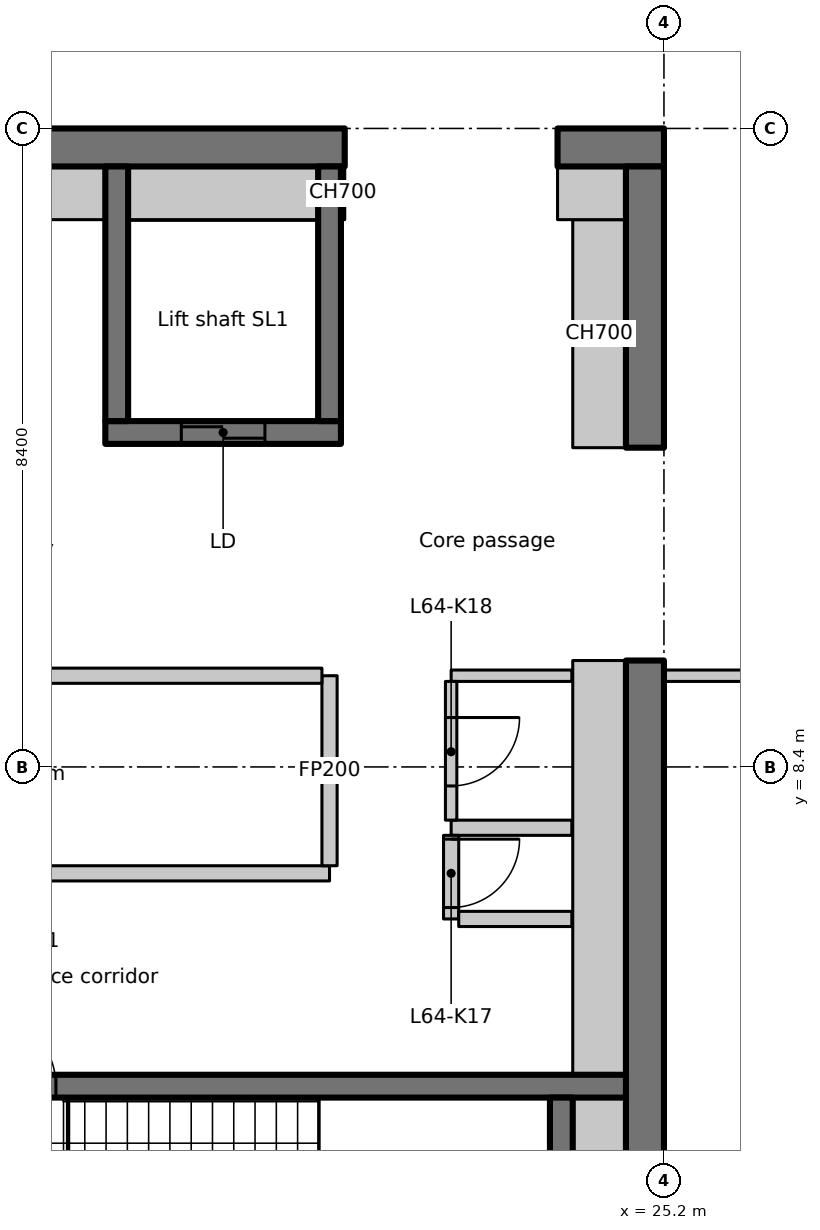
"""IFC4 building model, lengths in metres.
Left out: names, types, materials, properties, quantities, classifications, styles, units other than length and angle.
Written with IfcOpenShell. Run it as: python <this file> out.ifc"""

import sys

from ifc_helpers import new_model, si_unit, direction, frame, frame_2d, origin, place, context, subcontext, project, spatial, rectangle, extrude, element, fill, save


model = new_model("IFC4")
c1 = context("Model", 3, precision=1e-05, world=origin(), true_north=direction((0.0, 1.0)))
c2 = subcontext(c1, "Body", "Model", "MODEL_VIEW")
j1 = project(units=[si_unit("LENGTHUNIT", "METRE"), si_unit("PLANEANGLEUNIT", "RADIAN")], contexts=[c1])
p1 = place(None, origin())
s1 = spatial("IfcSite", under=j1, at=p1, CompositionType="ELEMENT")
p2 = place(p1, origin())
s2 = spatial("IfcBuilding", under=s1, at=p2, CompositionType="ELEMENT")
p3 = place(p2, frame((0.0, 0.0, 251.7)))
s3 = spatial("IfcBuildingStorey", under=s2, at=p3, CompositionType="ELEMENT", Elevation=251.7)
p4 = place(p3, frame((-1.1, 16.55, 0.0), z_axis=(0.0, 0.0, 1.0), x_axis=(1.0, 0.0, 0.0)))
e1 = element("IfcWall", 1, at=p4, inside=s3, PredefinedType="SHEAR", context=c2, shape_type="SweptSolid", body=[
    extrude(rectangle(XDim=22.1, YDim=0.5, at=frame_2d((11.05, 0.0))), origin(), (0.0, 0.0, 1.0), 4.05),
])
p5 = place(p4, frame((3.15, 0.0, 0.0)))
e2 = element("IfcOpeningElement", 2, at=p5, cuts=e1, PredefinedType="OPENING", context=c2, shape_type="SweptSolid", body=[
    extrude(rectangle(XDim=1.1, YDim=2.3, at=frame_2d((0.55, 1.15))), frame((0.0, 0.26, 0.0), z_axis=(0.0, -1.0, 0.0), x_axis=(1.0, 0.0, 0.0)), (0.0, 0.0, 1.0), 0.52),
])
p6 = place(p3, frame((23.8, 16.55, 0.0), z_axis=(0.0, 0.0, 1.0), x_axis=(1.0, 0.0, 0.0)))
e3 = element("IfcWall", 3, at=p6, inside=s3, PredefinedType="SHEAR", context=c2, shape_type="SweptSolid", body=[
    extrude(rectangle(XDim=1.4, YDim=0.5, at=frame_2d((0.7, 0.0))), origin(), (0.0, 0.0, 1.0), 4.05),
])
p7 = place(p3, frame((24.95, 0.5, 0.0), z_axis=(0.0, 0.0, 1.0), x_axis=(0.0, 1.0, 0.0)))
e4 = element("IfcWall", 4, at=p7, inside=s3, PredefinedType="SHEAR", context=c2, shape_type="SweptSolid", body=[
    extrude(rectangle(XDim=9.3, YDim=0.5, at=frame_2d((4.65, 0.0))), origin(), (0.0, 0.0, 1.0), 4.05),
])
p8 = place(p3, frame((24.95, 12.6, 0.0), z_axis=(0.0, 0.0, 1.0), x_axis=(0.0, 1.0, 0.0)))
e5 = element("IfcWall", 5, at=p8, inside=s3, PredefinedType="SHEAR", context=c2, shape_type="SweptSolid", body=[
    extrude(rectangle(XDim=3.7, YDim=0.5, at=frame_2d((1.85, 0.0))), origin(), (0.0, 0.0, 1.0), 4.05),
])
p9 = place(p3, frame((24.35, 12.6, 0.0), z_axis=(0.0, 0.0, 1.0), x_axis=(0.0, 1.0, 0.0)))
e6 = element("IfcWall", 6, at=p9, inside=s3, PredefinedType="PARTITIONING", context=c2, shape_type="SweptSolid", body=[
    extrude(rectangle(XDim=3.0, YDim=0.7, at=frame_2d((1.5, 0.0))), origin(), (0.0, 0.0, 1.0), 4.05),
])
p10 = place(p3, frame((23.8, 15.95, 0.0), z_axis=(0.0, 0.0, 1.0), x_axis=(1.0, 0.0, 0.0)))
e7 = element("IfcWall", 7, at=p10, inside=s3, PredefinedType="PARTITIONING", context=c2, shape_type="SweptSolid", body=[
    extrude(rectangle(XDim=0.9, YDim=0.7, at=frame_2d((0.45, 0.0))), origin(), (0.0, 0.0, 1.0), 4.05),
])
p11 = place(p3, frame((17.85, 12.8, 0.0), z_axis=(0.0, 0.0, 1.0), x_axis=(1.0, 0.0, 0.0)))
e8 = element("IfcWall", 8, at=p11, inside=s3, PredefinedType="SHEAR", context=c2, shape_type="SweptSolid", body=[
    extrude(rectangle(XDim=3.1, YDim=0.3, at=frame_2d((1.55, 0.0))), origin(), (0.0, 0.0, 1.0), 4.05),
])
p12 = place(p11, frame((1.0, 0.0, 0.0)))
e9 = element("IfcOpeningElement", 9, at=p12, cuts=e8, PredefinedType="OPENING", context=c2, shape_type="SweptSolid", body=[
    extrude(rectangle(XDim=1.1, YDim=2.3, at=frame_2d((0.55, 1.15))), frame((0.0, 0.16, 0.0), z_axis=(0.0, -1.0, 0.0), x_axis=(1.0, 0.0, 0.0)), (0.0, 0.0, 1.0), 0.32),
])
for number, where, z_axis, x_axis in (
    (10, (18.0, 12.95, 0.0), (0.0, 0.0, 1.0), (0.0, 1.0, 0.0)),
    (11, (20.8, 12.95, 0.0), (0.0, 0.0, 1.0), (0.0, 1.0, 0.0)),
):
    element("IfcWall", number, at=place(p3, frame(where, z_axis=z_axis, x_axis=x_axis)), inside=s3, PredefinedType="SHEAR", context=c2, shape_type="SweptSolid", body=[
        extrude(rectangle(XDim=3.35, YDim=0.3, at=frame_2d((1.675, 0.0))), origin(), (0.0, 0.0, 1.0), 4.05),
    ])
p13 = place(p3, frame((15.8, 4.2, 0.0), z_axis=(0.0, 0.0, 1.0), x_axis=(1.0, 0.0, 0.0)))
e12 = element("IfcWall", 12, at=p13, inside=s3, PredefinedType="SHEAR", context=c2, shape_type="SweptSolid", body=[
    extrude(rectangle(XDim=8.9, YDim=0.3, at=frame_2d((4.45, 0.0))), origin(), (0.0, 0.0, 1.0), 4.05),
])
p14 = place(p13, frame((0.4, 0.0, 0.0)))
e13 = element("IfcOpeningElement", 13, at=p14, cuts=e12, PredefinedType="OPENING", context=c2, shape_type="SweptSolid", body=[
    extrude(rectangle(XDim=1.0, YDim=2.1, at=frame_2d((0.5, 1.05))), frame((0.0, 0.16, 0.0), z_axis=(0.0, -1.0, 0.0), x_axis=(1.0, 0.0, 0.0)), (0.0, 0.0, 1.0), 0.32),
])
p15 = place(p3, frame((23.85, 1.5, 0.0), z_axis=(0.0, 0.0, 1.0), x_axis=(0.0, 1.0, 0.0)))
e14 = element("IfcWall", 14, at=p15, inside=s3, PredefinedType="SHEAR", context=c2, shape_type="SweptSolid", body=[
    extrude(rectangle(XDim=2.55, YDim=0.3, at=frame_2d((1.275, 0.0))), origin(), (0.0, 0.0, 1.0), 4.05),
])
p16 = place(p3, frame((12.4, 7.0, 0.0), z_axis=(0.0, 0.0, 1.0), x_axis=(1.0, 0.0, 0.0)))
e15 = element("IfcWall", 15, at=p16, inside=s3, PredefinedType="PARTITIONING", context=c2, shape_type="SweptSolid", body=[
    extrude(rectangle(XDim=8.4, YDim=0.2, at=frame_2d((4.2, 0.0))), origin(), (0.0, 0.0, 1.0), 4.05),
])
p17 = place(p3, frame((20.8, 7.1, 0.0), z_axis=(0.0, 0.0, 1.0), x_axis=(0.0, 1.0, 0.0)))
e16 = element("IfcWall", 16, at=p17, inside=s3, PredefinedType="PARTITIONING", context=c2, shape_type="SweptSolid", body=[
    extrude(rectangle(XDim=2.5, YDim=0.2, at=frame_2d((1.25, 0.0))), origin(), (0.0, 0.0, 1.0), 4.05),
])
p18 = place(p3, frame((20.7, 9.6, 0.0), z_axis=(0.0, 0.0, 1.0), x_axis=(-1.0, 0.0, 0.0)))
e17 = element("IfcWall", 17, at=p18, inside=s3, PredefinedType="PARTITIONING", context=c2, shape_type="SweptSolid", body=[
    extrude(rectangle(XDim=8.3, YDim=0.2, at=frame_2d((4.15, 0.0))), origin(), (0.0, 0.0, 1.0), 4.05),
])
p19 = place(p18, frame((3.65, 0.0, 0.0)))
e18 = element("IfcOpeningElement", 18, at=p19, cuts=e17, PredefinedType="OPENING", context=c2, shape_type="SweptSolid", body=[
    extrude(rectangle(XDim=0.9, YDim=2.1, at=frame_2d((0.45, 1.05))), frame((0.0, 0.11, 0.0), z_axis=(0.0, -1.0, 0.0), x_axis=(1.0, 0.0, 0.0)), (0.0, 0.0, 1.0), 0.22),
])
p20 = place(p3, frame((23.988, 7.6, 0.0), z_axis=(0.0, 0.0, 1.0), x_axis=(-1.0, 0.0, 0.0)))
e19 = element("IfcWall", 19, at=p20, inside=s3, PredefinedType="PARTITIONING", context=c2, shape_type="SweptSolid", body=[
    extrude(rectangle(XDim=1.588, YDim=0.2, at=frame_2d((0.794, 0.0))), origin(), (0.0, 0.0, 1.0), 4.05),
])
p21 = place(p3, frame((22.4, 7.5, 0.0), z_axis=(0.0, 0.0, 1.0), x_axis=(0.0, -1.0, 0.0)))
e20 = element("IfcWall", 20, at=p21, inside=s3, PredefinedType="PARTITIONING", context=c2, shape_type="SweptSolid", body=[
    extrude(rectangle(XDim=1.1, YDim=0.2, at=frame_2d((0.55, 0.0))), origin(), (0.0, 0.0, 1.0), 4.05),
])
p22 = place(p21, frame((0.05, 0.0, 0.0)))
e21 = element("IfcOpeningElement", 21, at=p22, cuts=e20, PredefinedType="OPENING", context=c2, shape_type="SweptSolid", body=[
    extrude(rectangle(XDim=0.9, YDim=2.1, at=frame_2d((0.45, 1.05))), frame((0.0, 0.11, 0.0), z_axis=(0.0, -1.0, 0.0), x_axis=(1.0, 0.0, 0.0)), (0.0, 0.0, 1.0), 0.22),
])
p23 = place(p3, frame((22.5, 6.4, 0.0), z_axis=(0.0, 0.0, 1.0), x_axis=(1.0, 0.0, 0.0)))
e22 = element("IfcWall", 22, at=p23, inside=s3, PredefinedType="PARTITIONING", context=c2, shape_type="SweptSolid", body=[
    extrude(rectangle(XDim=1.488, YDim=0.2, at=frame_2d((0.744, 0.0))), origin(), (0.0, 0.0, 1.0), 4.05),
])
p24 = place(p3, frame((23.988, 9.6, 0.0), z_axis=(0.0, 0.0, 1.0), x_axis=(-1.0, 0.0, 0.0)))
e23 = element("IfcWall", 23, at=p24, inside=s3, PredefinedType="PARTITIONING", context=c2, shape_type="SweptSolid", body=[
    extrude(rectangle(XDim=1.588, YDim=0.15, at=frame_2d((0.794, 0.0))), origin(), (0.0, 0.0, 1.0), 4.05),
])
p25 = place(p3, frame((22.4, 9.525, 0.0), z_axis=(0.0, 0.0, 1.0), x_axis=(0.0, -1.0, 0.0)))
e24 = element("IfcWall", 24, at=p25, inside=s3, PredefinedType="PARTITIONING", context=c2, shape_type="SweptSolid", body=[
    extrude(rectangle(XDim=1.825, YDim=0.15, at=frame_2d((0.913, 0.0))), origin(), (0.0, 0.0, 1.0), 4.05),
])
p26 = place(p25, frame((0.475, 0.0, 0.0)))
e25 = element("IfcOpeningElement", 25, at=p26, cuts=e24, PredefinedType="OPENING", context=c2, shape_type="SweptSolid", body=[
    extrude(rectangle(XDim=0.9, YDim=2.1, at=frame_2d((0.45, 1.05))), frame((0.0, 0.085, 0.0), z_axis=(0.0, -1.0, 0.0), x_axis=(1.0, 0.0, 0.0)), (0.0, 0.0, 1.0), 0.17),
])
for number, where, z_axis, x_axis in (
    (26, (15.35, 15.95, 0.0), (0.0, 0.0, 1.0), (1.0, 0.0, 0.0)),
    (27, (18.15, 15.95, 0.0), (0.0, 0.0, 1.0), (1.0, 0.0, 0.0)),
):
    element("IfcWall", number, at=place(p3, frame(where, z_axis=z_axis, x_axis=x_axis)), inside=s3, PredefinedType="PARTITIONING", context=c2, shape_type="SweptSolid", body=[
        extrude(rectangle(XDim=2.5, YDim=0.7, at=frame_2d((1.25, 0.0))), origin(), (0.0, 0.0, 1.0), 4.05),
    ])
p27 = place(p3, frame((20.95, 15.95, 0.0), z_axis=(0.0, 0.0, 1.0), x_axis=(1.0, 0.0, 0.0)))
e28 = element("IfcWall", 28, at=p27, inside=s3, PredefinedType="PARTITIONING", context=c2, shape_type="SweptSolid", body=[
    extrude(rectangle(XDim=0.05, YDim=0.7, at=frame_2d((0.025, 0.0))), origin(), (0.0, 0.0, 1.0), 4.05),
])
p28 = place(p3, frame((24.35, 1.5, 0.0), z_axis=(0.0, 0.0, 1.0), x_axis=(0.0, 1.0, 0.0)))
e29 = element("IfcWall", 29, at=p28, inside=s3, PredefinedType="PARTITIONING", context=c2, shape_type="SweptSolid", body=[
    extrude(rectangle(XDim=2.55, YDim=0.7, at=frame_2d((1.275, 0.0))), origin(), (0.0, 0.0, 1.0), 4.05),
])
p29 = place(p3, frame((24.35, 4.35, 0.0), z_axis=(0.0, 0.0, 1.0), x_axis=(0.0, 1.0, 0.0)))
e30 = element("IfcWall", 30, at=p29, inside=s3, PredefinedType="PARTITIONING", context=c2, shape_type="SweptSolid", body=[
    extrude(rectangle(XDim=5.45, YDim=0.7, at=frame_2d((2.725, 0.0))), origin(), (0.0, 0.0, 1.0), 4.05),
])
p30 = place(p3, frame((29.4, 9.6, 0.0), z_axis=(0.0, 0.0, 1.0), x_axis=(-1.0, 0.0, 0.0)))
e31 = element("IfcWall", 31, at=p30, inside=s3, PredefinedType="PARTITIONING", context=c2, shape_type="SweptSolid", body=[
    extrude(rectangle(XDim=4.2, YDim=0.15, at=frame_2d((2.1, 0.0))), origin(), (0.0, 0.0, 1.0), 4.03),
])
p31 = place(p30, frame((1.2, 0.0, 0.0)))
e32 = element("IfcOpeningElement", 32, at=p31, cuts=e31, PredefinedType="OPENING", context=c2, shape_type="SweptSolid", body=[
    extrude(rectangle(XDim=1.6, YDim=2.1, at=frame_2d((0.8, 1.05))), frame((0.0, 0.085, 0.0), z_axis=(0.0, -1.0, 0.0), x_axis=(1.0, 0.0, 0.0)), (0.0, 0.0, 1.0), 0.17),
])
p32 = place(p12, origin())
e33 = element("IfcDoor", 33, at=p32, inside=s3, OperationType="SLIDING_TO_LEFT", PredefinedType="DOOR", context=c2, shape_type="SweptSolid", body=[
    extrude(rectangle(XDim=1.1, YDim=2.3, at=frame_2d((0.55, 1.15))), frame((0.0, 0.025, 0.0), z_axis=(0.0, -1.0, 0.0), x_axis=(1.0, 0.0, 0.0)), (0.0, 0.0, 1.0), 0.05),
])
fill(e9, e33)
p33 = place(p14, origin())
e34 = element("IfcDoor", 34, at=p33, inside=s3, OperationType="SINGLE_SWING_LEFT", PredefinedType="DOOR", context=c2, shape_type="SweptSolid", body=[
    extrude(rectangle(XDim=1.0, YDim=2.1, at=frame_2d((0.5, 1.05))), frame((0.0, 0.025, 0.0), z_axis=(0.0, -1.0, 0.0), x_axis=(1.0, 0.0, 0.0)), (0.0, 0.0, 1.0), 0.05),
])
fill(e13, e34)
p34 = place(p22, origin())
e35 = element("IfcDoor", 35, at=p34, inside=s3, OperationType="SINGLE_SWING_LEFT", PredefinedType="DOOR", context=c2, shape_type="SweptSolid", body=[
    extrude(rectangle(XDim=0.9, YDim=2.1, at=frame_2d((0.45, 1.05))), frame((0.0, 0.025, 0.0), z_axis=(0.0, -1.0, 0.0), x_axis=(1.0, 0.0, 0.0)), (0.0, 0.0, 1.0), 0.05),
])
fill(e21, e35)
p35 = place(p26, origin())
e36 = element("IfcDoor", 36, at=p35, inside=s3, OperationType="SINGLE_SWING_RIGHT", PredefinedType="DOOR", context=c2, shape_type="SweptSolid", body=[
    extrude(rectangle(XDim=0.9, YDim=2.1, at=frame_2d((0.45, 1.05))), frame((0.0, 0.025, 0.0), z_axis=(0.0, -1.0, 0.0), x_axis=(1.0, 0.0, 0.0)), (0.0, 0.0, 1.0), 0.05),
])
fill(e25, e36)
save(model, sys.argv[1])
